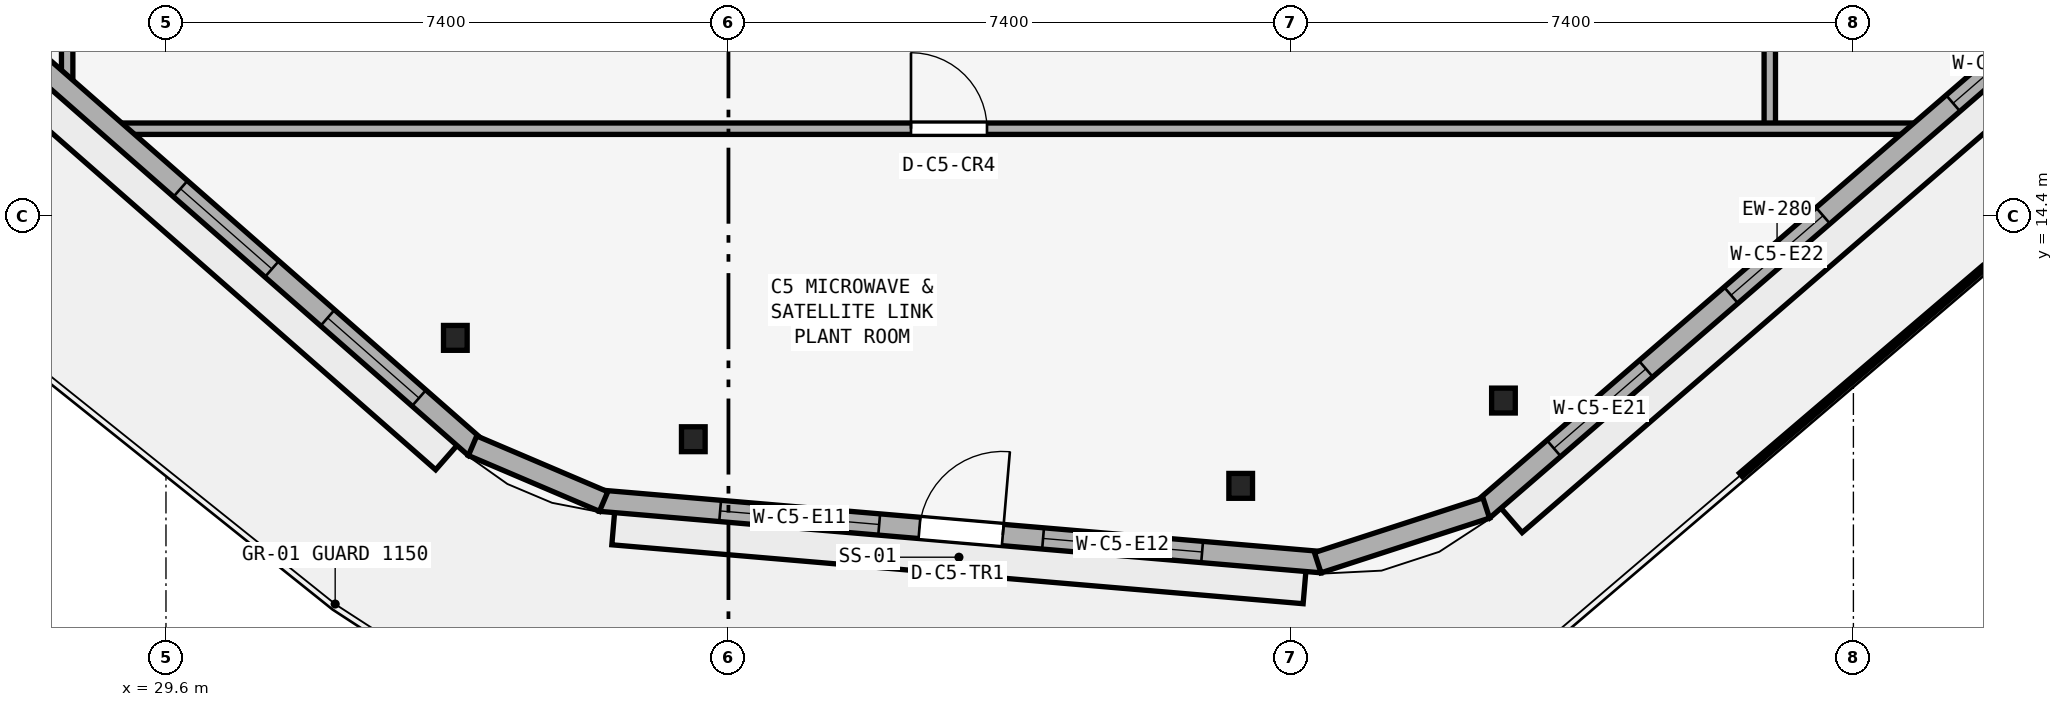
"""IFC4 building model, lengths in metres.
Left out: names, types, materials, properties, quantities, classifications, styles, units other than length and angle.
Written with IfcOpenShell. Run it as: python <this file> out.ifc"""

import sys

from ifc_helpers import new_model, si_unit, direction, frame, frame_2d, origin, origin_2d, place, context, subcontext, project, spatial, rectangle, i_section, extrude, element, fill, save


model = new_model("IFC4")
c1 = context("Model", 3, precision=1e-05, world=origin(), true_north=direction((0.0, 1.0)))
c2 = subcontext(c1, "Body", "Model", "MODEL_VIEW")
j1 = project(units=[si_unit("LENGTHUNIT", "METRE"), si_unit("PLANEANGLEUNIT", "RADIAN")], contexts=[c1])
p1 = place(None, origin())
s1 = spatial("IfcSite", under=j1, at=p1, CompositionType="ELEMENT")
p2 = place(p1, origin())
s2 = spatial("IfcBuilding", under=s1, at=p2, CompositionType="ELEMENT")
p3 = place(p2, frame((0.0, 0.0, 329.4)))
s3 = spatial("IfcBuildingStorey", under=s2, at=p3, CompositionType="ELEMENT", Elevation=329.4)
for number, where, z_axis, x_axis in (
    (1, (36.538, 11.465, 0.0), (0.0, 0.0, 1.0), (1.0, 0.0, 0.0)),
    (2, (43.739, 10.851, 0.0), (0.0, 0.0, 1.0), (1.0, 0.0, 0.0)),
    (3, (47.196, 11.973, 0.0), (0.0, 0.0, 1.0), (1.0, 0.0, 0.0)),
    (4, (33.407, 12.798, 0.0), (0.0, 0.0, 1.0), (1.0, 0.0, 0.0)),
):
    element("IfcColumn", number, at=place(p3, frame(where, z_axis=z_axis, x_axis=x_axis)), inside=s3, PredefinedType="COLUMN", context=c2, shape_type="SweptSolid", body=[
        extrude(i_section(OverallWidth=0.311, OverallDepth=0.327, WebThickness=0.016, FlangeThickness=0.025, at=origin_2d()), origin(), (0.0, 0.0, 1.0), 4.0),
    ])
p4 = place(p3, frame((50.7, 15.55, 0.0), z_axis=(0.0, 0.0, 1.0), x_axis=(0.0, 1.0, 0.0)))
e5 = element("IfcWall", 5, at=p4, inside=s3, PredefinedType="PARTITIONING", context=c2, shape_type="SweptSolid", body=[
    extrude(rectangle(XDim=19.3, YDim=0.15, at=frame_2d((9.65, 0.0))), origin(), (0.0, 0.0, 1.0), 3.72),
])
p5 = place(p4, frame((9.15, 0.0, 0.0)))
e6 = element("IfcOpeningElement", 6, at=p5, cuts=e5, PredefinedType="OPENING", context=c2, shape_type="SweptSolid", body=[
    extrude(rectangle(XDim=1.0, YDim=2.12, at=frame_2d((0.5, 1.06))), frame((0.0, 0.085, 0.0), z_axis=(0.0, -1.0, 0.0), x_axis=(1.0, 0.0, 0.0)), (0.0, 0.0, 1.0), 0.17),
])
p6 = place(p3, frame((28.3, 16.022, 0.0), z_axis=(0.0, 0.0, 1.0), x_axis=(0.0, 1.0, 0.0)))
e7 = element("IfcWall", 7, at=p6, inside=s3, PredefinedType="PARTITIONING", context=c2, shape_type="SweptSolid", body=[
    extrude(rectangle(XDim=17.933, YDim=0.15, at=frame_2d((8.967, 0.0))), origin(), (0.0, 0.0, 1.0), 3.176),
])
p7 = place(p6, frame((8.464, 0.0, 0.0)))
e8 = element("IfcOpeningElement", 8, at=p7, cuts=e7, PredefinedType="OPENING", context=c2, shape_type="SweptSolid", body=[
    extrude(rectangle(XDim=1.0, YDim=2.12, at=frame_2d((0.5, 1.06))), frame((0.0, 0.085, 0.0), z_axis=(0.0, -1.0, 0.0), x_axis=(1.0, 0.0, 0.0)), (0.0, 0.0, 1.0), 0.17),
])
p8 = place(p3, frame((28.818, 15.55, 0.0), z_axis=(0.0, 0.0, 1.0), x_axis=(1.0, 0.0, 0.0)))
e9 = element("IfcWall", 9, at=p8, inside=s3, PredefinedType="PARTITIONING", context=c2, shape_type="SweptSolid", body=[
    extrude(rectangle(XDim=23.98, YDim=0.15, at=frame_2d((11.99, 0.0))), origin(), (0.0, 0.0, 1.0), 3.72),
])
p9 = place(p8, frame((10.583, 0.0, 0.0)))
e10 = element("IfcOpeningElement", 10, at=p9, cuts=e9, PredefinedType="OPENING", context=c2, shape_type="SweptSolid", body=[
    extrude(rectangle(XDim=1.0, YDim=2.12, at=frame_2d((0.5, 1.06))), frame((0.0, 0.085, 0.0), z_axis=(0.0, -1.0, 0.0), x_axis=(1.0, 0.0, 0.0)), (0.0, 0.0, 1.0), 0.17),
])
p10 = place(p3, frame((35.314, 10.656, 0.0), z_axis=(0.0, 0.0, 1.0), x_axis=(0.996390125679, -0.08489238746, 0.0)))
e11 = element("IfcWall", 11, at=p10, inside=s3, PredefinedType="STANDARD", context=c2, shape_type="SweptSolid", body=[
    extrude(rectangle(XDim=9.528, YDim=0.28, at=frame_2d((4.764, 0.0))), origin(), (0.0, 0.0, 1.0), 3.72),
])
p11 = place(p10, frame((4.214, 0.0, 0.0)))
e12 = element("IfcOpeningElement", 12, at=p11, cuts=e11, PredefinedType="OPENING", context=c2, shape_type="SweptSolid", body=[
    extrude(rectangle(XDim=1.1, YDim=2.2, at=frame_2d((0.55, 1.1))), frame((0.0, 0.15, 0.0), z_axis=(0.0, -1.0, 0.0), x_axis=(1.0, 0.0, 0.0)), (0.0, 0.0, 1.0), 0.3),
])
p12 = place(p10, frame((1.582, 0.0, 0.9)))
e13 = element("IfcOpeningElement", 13, at=p12, cuts=e11, PredefinedType="OPENING", context=c2, shape_type="SweptSolid", body=[
    extrude(rectangle(XDim=2.1, YDim=1.7, at=frame_2d((1.05, 0.85))), frame((0.0, 0.15, 0.0), z_axis=(0.0, -1.0, 0.0), x_axis=(1.0, 0.0, 0.0)), (0.0, 0.0, 1.0), 0.3),
])
p13 = place(p10, frame((5.846, 0.0, 0.9)))
e14 = element("IfcOpeningElement", 14, at=p13, cuts=e11, PredefinedType="OPENING", context=c2, shape_type="SweptSolid", body=[
    extrude(rectangle(XDim=2.1, YDim=1.7, at=frame_2d((1.05, 0.85))), frame((0.0, 0.15, 0.0), z_axis=(0.0, -1.0, 0.0), x_axis=(1.0, 0.0, 0.0)), (0.0, 0.0, 1.0), 0.3),
])
p14 = place(p3, frame((46.921, 10.533, 0.0), z_axis=(0.0, 0.0, 1.0), x_axis=(0.756489047049, 0.654006362121, 0.0)))
e15 = element("IfcWall", 15, at=p14, inside=s3, PredefinedType="STANDARD", context=c2, shape_type="SweptSolid", body=[
    extrude(rectangle(XDim=10.244, YDim=0.28, at=frame_2d((5.122, 0.0))), origin(), (0.0, 0.0, 1.0), 3.72),
])
p15 = place(p14, frame((1.24, 0.0, 0.9)))
e16 = element("IfcOpeningElement", 16, at=p15, cuts=e15, PredefinedType="OPENING", context=c2, shape_type="SweptSolid", body=[
    extrude(rectangle(XDim=1.6, YDim=1.45, at=frame_2d((0.8, 0.725))), frame((0.0, 0.15, 0.0), z_axis=(0.0, -1.0, 0.0), x_axis=(1.0, 0.0, 0.0)), (0.0, 0.0, 1.0), 0.3),
])
p16 = place(p14, frame((4.322, 0.0, 0.9)))
e17 = element("IfcOpeningElement", 17, at=p16, cuts=e15, PredefinedType="OPENING", context=c2, shape_type="SweptSolid", body=[
    extrude(rectangle(XDim=1.6, YDim=1.45, at=frame_2d((0.8, 0.725))), frame((0.0, 0.15, 0.0), z_axis=(0.0, -1.0, 0.0), x_axis=(1.0, 0.0, 0.0)), (0.0, 0.0, 1.0), 0.3),
])
p17 = place(p14, frame((8.183, 0.0, 0.9)))
e18 = element("IfcOpeningElement", 18, at=p17, cuts=e15, PredefinedType="OPENING", context=c2, shape_type="SweptSolid", body=[
    extrude(rectangle(XDim=1.6, YDim=1.45, at=frame_2d((0.8, 0.725))), frame((0.0, 0.15, 0.0), z_axis=(0.0, -1.0, 0.0), x_axis=(1.0, 0.0, 0.0)), (0.0, 0.0, 1.0), 0.3),
])
p18 = place(p3, frame((27.114, 17.109, 0.0), z_axis=(0.0, 0.0, 1.0), x_axis=(0.751684867815, -0.659522448062, 0.0)))
e19 = element("IfcWall", 19, at=p18, inside=s3, PredefinedType="STANDARD", context=c2, shape_type="SweptSolid", body=[
    extrude(rectangle(XDim=8.723, YDim=0.28, at=frame_2d((4.362, 0.0))), origin(), (0.0, 0.0, 1.0), 3.72),
])
p19 = place(p18, frame((3.562, 0.0, 0.9)))
e20 = element("IfcOpeningElement", 20, at=p19, cuts=e19, PredefinedType="OPENING", context=c2, shape_type="SweptSolid", body=[
    extrude(rectangle(XDim=1.6, YDim=1.45, at=frame_2d((0.8, 0.725))), frame((0.0, 0.15, 0.0), z_axis=(0.0, -1.0, 0.0), x_axis=(1.0, 0.0, 0.0)), (0.0, 0.0, 1.0), 0.3),
])
p20 = place(p18, frame((6.136, 0.0, 0.9)))
e21 = element("IfcOpeningElement", 21, at=p20, cuts=e19, PredefinedType="OPENING", context=c2, shape_type="SweptSolid", body=[
    extrude(rectangle(XDim=1.6, YDim=1.45, at=frame_2d((0.8, 0.725))), frame((0.0, 0.15, 0.0), z_axis=(0.0, -1.0, 0.0), x_axis=(1.0, 0.0, 0.0)), (0.0, 0.0, 1.0), 0.3),
])
p21 = place(p3, frame((44.753, 9.841, 0.0), z_axis=(0.0, 0.0, 1.0), x_axis=(0.951126400132, 0.308801831232, 0.0)))
e22 = element("IfcWall", 22, at=p21, inside=s3, PredefinedType="STANDARD", context=c2, shape_type="SweptSolid", body=[
    extrude(rectangle(XDim=2.331, YDim=0.28, at=frame_2d((1.166, 0.0))), origin(), (0.0, 0.0, 1.0), 3.72),
])
p22 = place(p3, frame((33.634, 11.379, 0.0), z_axis=(0.0, 0.0, 1.0), x_axis=(0.920045725698, -0.391811003707, 0.0)))
e23 = element("IfcWall", 23, at=p22, inside=s3, PredefinedType="STANDARD", context=c2, shape_type="SweptSolid", body=[
    extrude(rectangle(XDim=1.874, YDim=0.28, at=frame_2d((0.937, 0.0))), origin(), (0.0, 0.0, 1.0), 3.72),
])
p23 = place(p9, origin())
e24 = element("IfcDoor", 24, at=p23, inside=s3, OperationType="SINGLE_SWING_LEFT", PredefinedType="DOOR", context=c2, shape_type="SweptSolid", body=[
    extrude(rectangle(XDim=1.0, YDim=2.12, at=frame_2d((0.5, 1.06))), frame((0.0, 0.025, 0.0), z_axis=(0.0, -1.0, 0.0), x_axis=(1.0, 0.0, 0.0)), (0.0, 0.0, 1.0), 0.05),
])
fill(e10, e24)
p24 = place(p11, origin())
e25 = element("IfcDoor", 25, at=p24, inside=s3, OperationType="SINGLE_SWING_RIGHT", PredefinedType="DOOR", context=c2, shape_type="SweptSolid", body=[
    extrude(rectangle(XDim=1.1, YDim=2.2, at=frame_2d((0.55, 1.1))), frame((0.0, 0.025, 0.0), z_axis=(0.0, -1.0, 0.0), x_axis=(1.0, 0.0, 0.0)), (0.0, 0.0, 1.0), 0.05),
])
fill(e12, e25)
p25 = place(p12, origin())
e26 = element("IfcWindow", 26, at=p25, inside=s3, PartitioningType="SINGLE_PANEL", PredefinedType="WINDOW", context=c2, shape_type="SweptSolid", body=[
    extrude(rectangle(XDim=2.1, YDim=1.7, at=frame_2d((1.05, 0.85))), frame((0.0, 0.03, 0.0), z_axis=(0.0, -1.0, 0.0), x_axis=(1.0, 0.0, 0.0)), (0.0, 0.0, 1.0), 0.06),
])
fill(e13, e26)
p26 = place(p13, origin())
e27 = element("IfcWindow", 27, at=p26, inside=s3, PartitioningType="SINGLE_PANEL", PredefinedType="WINDOW", context=c2, shape_type="SweptSolid", body=[
    extrude(rectangle(XDim=2.1, YDim=1.7, at=frame_2d((1.05, 0.85))), frame((0.0, 0.03, 0.0), z_axis=(0.0, -1.0, 0.0), x_axis=(1.0, 0.0, 0.0)), (0.0, 0.0, 1.0), 0.06),
])
fill(e14, e27)
p27 = place(p15, origin())
e28 = element("IfcWindow", 28, at=p27, inside=s3, PartitioningType="SINGLE_PANEL", PredefinedType="WINDOW", context=c2, shape_type="SweptSolid", body=[
    extrude(rectangle(XDim=1.6, YDim=1.45, at=frame_2d((0.8, 0.725))), frame((0.0, 0.03, 0.0), z_axis=(0.0, -1.0, 0.0), x_axis=(1.0, 0.0, 0.0)), (0.0, 0.0, 1.0), 0.06),
])
fill(e16, e28)
p28 = place(p16, origin())
e29 = element("IfcWindow", 29, at=p28, inside=s3, PartitioningType="SINGLE_PANEL", PredefinedType="WINDOW", context=c2, shape_type="SweptSolid", body=[
    extrude(rectangle(XDim=1.6, YDim=1.45, at=frame_2d((0.8, 0.725))), frame((0.0, 0.03, 0.0), z_axis=(0.0, -1.0, 0.0), x_axis=(1.0, 0.0, 0.0)), (0.0, 0.0, 1.0), 0.06),
])
fill(e17, e29)
p29 = place(p17, origin())
e30 = element("IfcWindow", 30, at=p29, inside=s3, PartitioningType="SINGLE_PANEL", PredefinedType="WINDOW", context=c2, shape_type="SweptSolid", body=[
    extrude(rectangle(XDim=1.6, YDim=1.45, at=frame_2d((0.8, 0.725))), frame((0.0, 0.03, 0.0), z_axis=(0.0, -1.0, 0.0), x_axis=(1.0, 0.0, 0.0)), (0.0, 0.0, 1.0), 0.06),
])
fill(e18, e30)
p30 = place(p19, origin())
e31 = element("IfcWindow", 31, at=p30, inside=s3, PartitioningType="SINGLE_PANEL", PredefinedType="WINDOW", context=c2, shape_type="SweptSolid", body=[
    extrude(rectangle(XDim=1.6, YDim=1.45, at=frame_2d((0.8, 0.725))), frame((0.0, 0.03, 0.0), z_axis=(0.0, -1.0, 0.0), x_axis=(1.0, 0.0, 0.0)), (0.0, 0.0, 1.0), 0.06),
])
fill(e20, e31)
p31 = place(p20, origin())
e32 = element("IfcWindow", 32, at=p31, inside=s3, PartitioningType="SINGLE_PANEL", PredefinedType="WINDOW", context=c2, shape_type="SweptSolid", body=[
    extrude(rectangle(XDim=1.6, YDim=1.45, at=frame_2d((0.8, 0.725))), frame((0.0, 0.03, 0.0), z_axis=(0.0, -1.0, 0.0), x_axis=(1.0, 0.0, 0.0)), (0.0, 0.0, 1.0), 0.06),
])
fill(e21, e32)
save(model, sys.argv[1])
